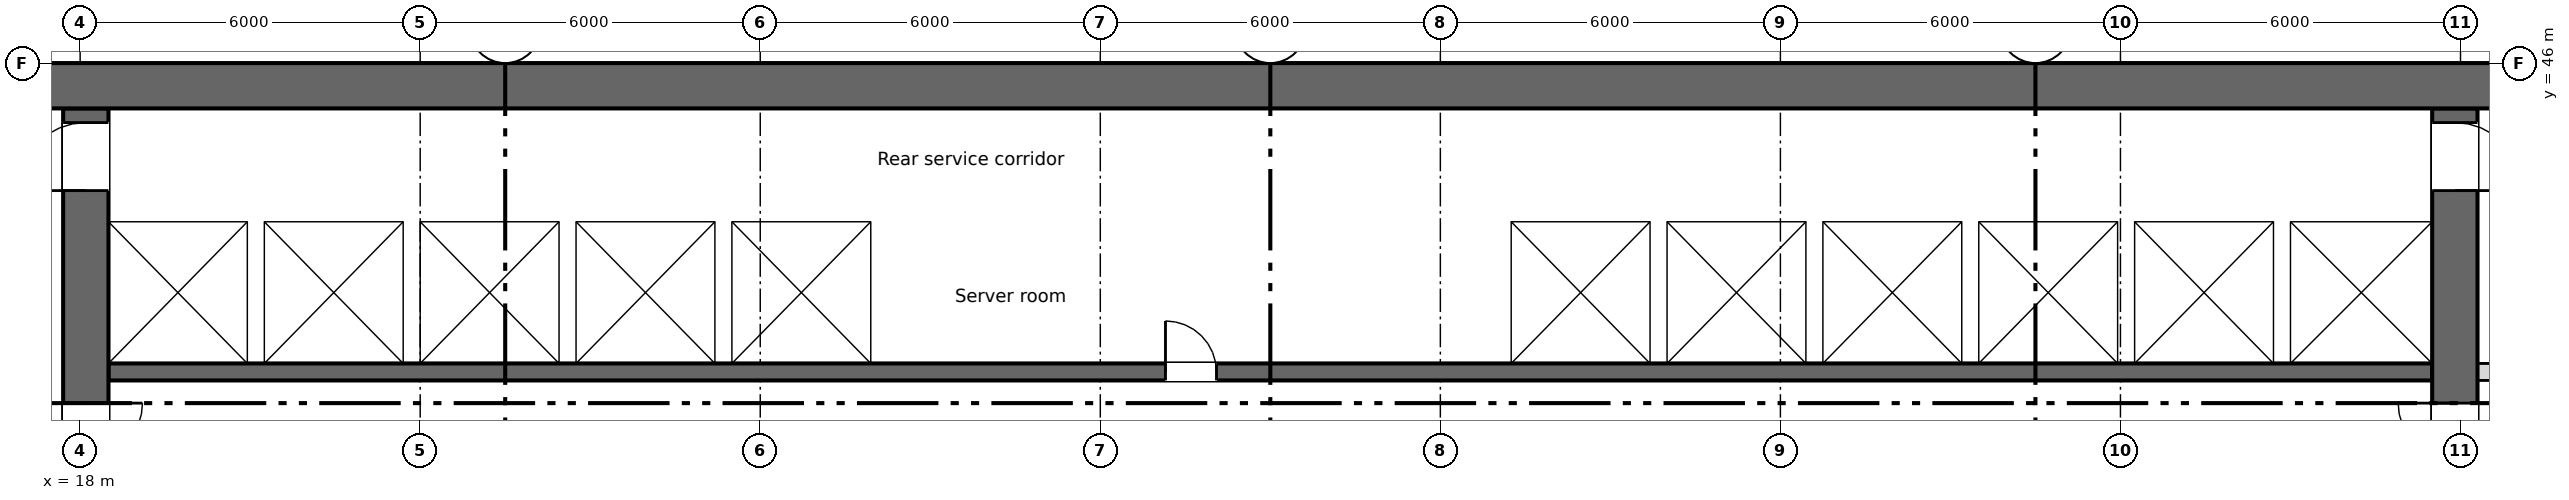
"""IFC4 building model, lengths in metres.
Left out: names, types, materials, properties, quantities, classifications, styles, units other than length and angle.
Written with IfcOpenShell. Run it as: python <this file> out.ifc"""

import sys

from ifc_helpers import new_model, si_unit, direction, frame, frame_2d, origin, place, context, subcontext, project, spatial, rectangle, extrude, element, fill, save


model = new_model("IFC4")
c1 = context("Model", 3, precision=1e-05, world=origin(), true_north=direction((0.0, 1.0)))
c2 = subcontext(c1, "Body", "Model", "MODEL_VIEW")
j1 = project(units=[si_unit("LENGTHUNIT", "METRE"), si_unit("PLANEANGLEUNIT", "RADIAN")], contexts=[c1])
p1 = place(None, origin())
s1 = spatial("IfcSite", under=j1, at=p1, CompositionType="ELEMENT")
p2 = place(p1, origin())
s2 = spatial("IfcBuilding", under=s1, at=p2, CompositionType="ELEMENT")
p3 = place(p2, frame((0.0, 0.0, 121.25)))
s3 = spatial("IfcBuildingStorey", under=s2, at=p3, CompositionType="ELEMENT", Elevation=121.25)
p4 = place(p3, frame((5.55, 45.6, 0.0), z_axis=(0.0, 0.0, 1.0), x_axis=(1.0, 0.0, 0.0)))
e1 = element("IfcWall", 1, at=p4, inside=s3, PredefinedType="SHEAR", context=c2, shape_type="SweptSolid", body=[
    extrude(rectangle(XDim=60.9, YDim=0.8, at=frame_2d((30.45, 0.0))), origin(), (0.0, 0.0, 1.0), 3.35),
])
p5 = place(p4, frame((7.2, 0.0, 0.6)))
e2 = element("IfcOpeningElement", 2, at=p5, cuts=e1, PredefinedType="OPENING", context=c2, shape_type="SweptSolid", body=[
    extrude(rectangle(XDim=0.6, YDim=2.4, at=frame_2d((0.3, 1.2))), frame((0.0, 0.41, 0.0), z_axis=(0.0, -1.0, 0.0), x_axis=(1.0, 0.0, 0.0)), (0.0, 0.0, 1.0), 0.82),
])
p6 = place(p3, frame((18.1, 28.4, 0.0), z_axis=(0.0, 0.0, 1.0), x_axis=(0.0, 1.0, 0.0)))
e3 = element("IfcWall", 3, at=p6, inside=s3, PredefinedType="SHEAR", context=c2, shape_type="SweptSolid", body=[
    extrude(rectangle(XDim=16.8, YDim=0.8, at=frame_2d((8.4, 0.0))), origin(), (0.0, 0.0, 1.0), 3.35),
])
p7 = place(p6, frame((9.6, 0.0, 0.0)))
e4 = element("IfcOpeningElement", 4, at=p7, cuts=e3, PredefinedType="OPENING", context=c2, shape_type="SweptSolid", body=[
    extrude(rectangle(XDim=2.0, YDim=2.1, at=frame_2d((1.0, 1.05))), frame((0.0, 0.41, 0.0), z_axis=(0.0, -1.0, 0.0), x_axis=(1.0, 0.0, 0.0)), (0.0, 0.0, 1.0), 0.82),
])
p8 = place(p6, frame((15.35, 0.0, 0.0)))
e5 = element("IfcOpeningElement", 5, at=p8, cuts=e3, PredefinedType="OPENING", context=c2, shape_type="SweptSolid", body=[
    extrude(rectangle(XDim=1.2, YDim=2.1, at=frame_2d((0.6, 1.05))), frame((0.0, 0.41, 0.0), z_axis=(0.0, -1.0, 0.0), x_axis=(1.0, 0.0, 0.0)), (0.0, 0.0, 1.0), 0.82),
])
p9 = place(p3, frame((59.9, 28.4, 0.0), z_axis=(0.0, 0.0, 1.0), x_axis=(0.0, 1.0, 0.0)))
e6 = element("IfcWall", 6, at=p9, inside=s3, PredefinedType="SHEAR", context=c2, shape_type="SweptSolid", body=[
    extrude(rectangle(XDim=16.8, YDim=0.8, at=frame_2d((8.4, 0.0))), origin(), (0.0, 0.0, 1.0), 3.35),
])
p10 = place(p9, frame((9.6, 0.0, 0.0)))
e7 = element("IfcOpeningElement", 7, at=p10, cuts=e6, PredefinedType="OPENING", context=c2, shape_type="SweptSolid", body=[
    extrude(rectangle(XDim=2.0, YDim=2.1, at=frame_2d((1.0, 1.05))), frame((0.0, 0.41, 0.0), z_axis=(0.0, -1.0, 0.0), x_axis=(1.0, 0.0, 0.0)), (0.0, 0.0, 1.0), 0.82),
])
p11 = place(p9, frame((15.35, 0.0, 0.0)))
e8 = element("IfcOpeningElement", 8, at=p11, cuts=e6, PredefinedType="OPENING", context=c2, shape_type="SweptSolid", body=[
    extrude(rectangle(XDim=1.2, YDim=2.1, at=frame_2d((0.6, 1.05))), frame((0.0, 0.41, 0.0), z_axis=(0.0, -1.0, 0.0), x_axis=(1.0, 0.0, 0.0)), (0.0, 0.0, 1.0), 0.82),
])
p12 = place(p3, frame((18.5, 40.55, 0.0), z_axis=(0.0, 0.0, 1.0), x_axis=(1.0, 0.0, 0.0)))
e9 = element("IfcWall", 9, at=p12, inside=s3, PredefinedType="SHEAR", context=c2, shape_type="SweptSolid", body=[
    extrude(rectangle(XDim=41.0, YDim=0.3, at=frame_2d((20.5, 0.0))), origin(), (0.0, 0.0, 1.0), 3.35),
])
p13 = place(p12, frame((18.65, 0.0, 0.0)))
e10 = element("IfcOpeningElement", 10, at=p13, cuts=e9, PredefinedType="OPENING", context=c2, shape_type="SweptSolid", body=[
    extrude(rectangle(XDim=0.9, YDim=2.1, at=frame_2d((0.45, 1.05))), frame((0.0, 0.16, 0.0), z_axis=(0.0, -1.0, 0.0), x_axis=(1.0, 0.0, 0.0)), (0.0, 0.0, 1.0), 0.32),
])
p14 = place(p12, frame((6.175, 0.0, 0.0)))
e11 = element("IfcOpeningElement", 11, at=p14, cuts=e9, PredefinedType="OPENING", context=c2, shape_type="SweptSolid", body=[
    extrude(rectangle(XDim=1.1, YDim=2.1, at=frame_2d((0.55, 1.05))), frame((0.0, 0.16, 0.0), z_axis=(0.0, -1.0, 0.0), x_axis=(1.0, 0.0, 0.0)), (0.0, 0.0, 1.0), 0.32),
])
p15 = place(p12, frame((8.925, 0.0, 0.0)))
e12 = element("IfcOpeningElement", 12, at=p15, cuts=e9, PredefinedType="OPENING", context=c2, shape_type="SweptSolid", body=[
    extrude(rectangle(XDim=1.1, YDim=2.1, at=frame_2d((0.55, 1.05))), frame((0.0, 0.16, 0.0), z_axis=(0.0, -1.0, 0.0), x_axis=(1.0, 0.0, 0.0)), (0.0, 0.0, 1.0), 0.32),
])
p16 = place(p12, frame((11.675, 0.0, 0.0)))
e13 = element("IfcOpeningElement", 13, at=p16, cuts=e9, PredefinedType="OPENING", context=c2, shape_type="SweptSolid", body=[
    extrude(rectangle(XDim=1.1, YDim=2.1, at=frame_2d((0.55, 1.05))), frame((0.0, 0.16, 0.0), z_axis=(0.0, -1.0, 0.0), x_axis=(1.0, 0.0, 0.0)), (0.0, 0.0, 1.0), 0.32),
])
p17 = place(p12, frame((30.925, 0.0, 0.0)))
e14 = element("IfcOpeningElement", 14, at=p17, cuts=e9, PredefinedType="OPENING", context=c2, shape_type="SweptSolid", body=[
    extrude(rectangle(XDim=1.1, YDim=2.1, at=frame_2d((0.55, 1.05))), frame((0.0, 0.16, 0.0), z_axis=(0.0, -1.0, 0.0), x_axis=(1.0, 0.0, 0.0)), (0.0, 0.0, 1.0), 0.32),
])
p18 = place(p12, frame((33.675, 0.0, 0.0)))
e15 = element("IfcOpeningElement", 15, at=p18, cuts=e9, PredefinedType="OPENING", context=c2, shape_type="SweptSolid", body=[
    extrude(rectangle(XDim=1.1, YDim=2.1, at=frame_2d((0.55, 1.05))), frame((0.0, 0.16, 0.0), z_axis=(0.0, -1.0, 0.0), x_axis=(1.0, 0.0, 0.0)), (0.0, 0.0, 1.0), 0.32),
])
p19 = place(p12, frame((36.375, 0.0, 0.0)))
e16 = element("IfcOpeningElement", 16, at=p19, cuts=e9, PredefinedType="OPENING", context=c2, shape_type="SweptSolid", body=[
    extrude(rectangle(XDim=1.2, YDim=2.1, at=frame_2d((0.6, 1.05))), frame((0.0, 0.16, 0.0), z_axis=(0.0, -1.0, 0.0), x_axis=(1.0, 0.0, 0.0)), (0.0, 0.0, 1.0), 0.32),
])
p20 = place(p12, frame((39.15, 0.0, 0.0)))
e17 = element("IfcOpeningElement", 17, at=p20, cuts=e9, PredefinedType="OPENING", context=c2, shape_type="SweptSolid", body=[
    extrude(rectangle(XDim=1.2, YDim=2.1, at=frame_2d((0.6, 1.05))), frame((0.0, 0.16, 0.0), z_axis=(0.0, -1.0, 0.0), x_axis=(1.0, 0.0, 0.0)), (0.0, 0.0, 1.0), 0.32),
])
p21 = place(p3, frame((18.5, 43.35, 0.0), z_axis=(0.0, 0.0, 1.0), x_axis=(1.0, 0.0, 0.0)))
e18 = element("IfcWall", 18, at=p21, inside=s3, PredefinedType="SHEAR", context=c2, shape_type="SweptSolid", body=[
    extrude(rectangle(XDim=41.0, YDim=0.3, at=frame_2d((20.5, 0.0))), origin(), (0.0, 0.0, 1.0), 3.35),
])
p22 = place(p3, frame((60.3, 40.55, 0.0), z_axis=(0.0, 0.0, 1.0), x_axis=(1.0, 0.0, 0.0)))
e19 = element("IfcWall", 19, at=p22, inside=s3, PredefinedType="PARTITIONING", context=c2, shape_type="SweptSolid", body=[
    extrude(rectangle(XDim=2.4, YDim=0.3, at=frame_2d((1.2, 0.0))), origin(), (0.0, 0.0, 1.0), 3.35),
])
p23 = place(p22, frame((0.675, 0.0, 0.0)))
e20 = element("IfcOpeningElement", 20, at=p23, cuts=e19, PredefinedType="OPENING", context=c2, shape_type="SweptSolid", body=[
    extrude(rectangle(XDim=0.9, YDim=2.1, at=frame_2d((0.45, 1.05))), frame((0.0, 0.16, 0.0), z_axis=(0.0, -1.0, 0.0), x_axis=(1.0, 0.0, 0.0)), (0.0, 0.0, 1.0), 0.32),
])
for number, where, z_axis, x_axis in (
    (21, (21.1, 40.7, 0.0), (0.0, 0.0, 1.0), (0.0, 1.0, 0.0)),
    (22, (23.85, 40.7, 0.0), (0.0, 0.0, 1.0), (0.0, 1.0, 0.0)),
    (23, (26.6, 40.7, 0.0), (0.0, 0.0, 1.0), (0.0, 1.0, 0.0)),
    (24, (29.35, 40.7, 0.0), (0.0, 0.0, 1.0), (0.0, 1.0, 0.0)),
    (25, (32.1, 40.7, 0.0), (0.0, 0.0, 1.0), (0.0, 1.0, 0.0)),
    (26, (43.1, 40.7, 0.0), (0.0, 0.0, 1.0), (0.0, 1.0, 0.0)),
    (27, (45.85, 40.7, 0.0), (0.0, 0.0, 1.0), (0.0, 1.0, 0.0)),
    (28, (48.6, 40.7, 0.0), (0.0, 0.0, 1.0), (0.0, 1.0, 0.0)),
    (29, (51.35, 40.7, 0.0), (0.0, 0.0, 1.0), (0.0, 1.0, 0.0)),
    (30, (54.1, 40.7, 0.0), (0.0, 0.0, 1.0), (0.0, 1.0, 0.0)),
    (31, (56.85, 40.7, 0.0), (0.0, 0.0, 1.0), (0.0, 1.0, 0.0)),
):
    element("IfcWall", number, at=place(p3, frame(where, z_axis=z_axis, x_axis=x_axis)), inside=s3, PredefinedType="SHEAR", context=c2, shape_type="SweptSolid", body=[
        extrude(rectangle(XDim=2.5, YDim=0.3, at=frame_2d((1.25, 0.0))), origin(), (0.0, 0.0, 1.0), 3.35),
    ])
p24 = place(p13, origin())
e32 = element("IfcDoor", 32, at=p24, inside=s3, OperationType="SINGLE_SWING_LEFT", PredefinedType="DOOR", context=c2, shape_type="SweptSolid", body=[
    extrude(rectangle(XDim=0.9, YDim=2.1, at=frame_2d((0.45, 1.05))), frame((0.0, 0.025, 0.0), z_axis=(0.0, -1.0, 0.0), x_axis=(1.0, 0.0, 0.0)), (0.0, 0.0, 1.0), 0.05),
])
fill(e10, e32)
p25 = place(p14, origin())
e33 = element("IfcDoor", 33, at=p25, inside=s3, OperationType="SLIDING_TO_LEFT", PredefinedType="DOOR", context=c2, shape_type="SweptSolid", body=[
    extrude(rectangle(XDim=1.1, YDim=2.1, at=frame_2d((0.55, 1.05))), frame((0.0, 0.025, 0.0), z_axis=(0.0, -1.0, 0.0), x_axis=(1.0, 0.0, 0.0)), (0.0, 0.0, 1.0), 0.05),
])
fill(e11, e33)
p26 = place(p15, origin())
e34 = element("IfcDoor", 34, at=p26, inside=s3, OperationType="SLIDING_TO_LEFT", PredefinedType="DOOR", context=c2, shape_type="SweptSolid", body=[
    extrude(rectangle(XDim=1.1, YDim=2.1, at=frame_2d((0.55, 1.05))), frame((0.0, 0.025, 0.0), z_axis=(0.0, -1.0, 0.0), x_axis=(1.0, 0.0, 0.0)), (0.0, 0.0, 1.0), 0.05),
])
fill(e12, e34)
p27 = place(p16, origin())
e35 = element("IfcDoor", 35, at=p27, inside=s3, OperationType="SLIDING_TO_LEFT", PredefinedType="DOOR", context=c2, shape_type="SweptSolid", body=[
    extrude(rectangle(XDim=1.1, YDim=2.1, at=frame_2d((0.55, 1.05))), frame((0.0, 0.025, 0.0), z_axis=(0.0, -1.0, 0.0), x_axis=(1.0, 0.0, 0.0)), (0.0, 0.0, 1.0), 0.05),
])
fill(e13, e35)
p28 = place(p17, origin())
e36 = element("IfcDoor", 36, at=p28, inside=s3, OperationType="SLIDING_TO_LEFT", PredefinedType="DOOR", context=c2, shape_type="SweptSolid", body=[
    extrude(rectangle(XDim=1.1, YDim=2.1, at=frame_2d((0.55, 1.05))), frame((0.0, 0.025, 0.0), z_axis=(0.0, -1.0, 0.0), x_axis=(1.0, 0.0, 0.0)), (0.0, 0.0, 1.0), 0.05),
])
fill(e14, e36)
p29 = place(p18, origin())
e37 = element("IfcDoor", 37, at=p29, inside=s3, OperationType="SLIDING_TO_LEFT", PredefinedType="DOOR", context=c2, shape_type="SweptSolid", body=[
    extrude(rectangle(XDim=1.1, YDim=2.1, at=frame_2d((0.55, 1.05))), frame((0.0, 0.025, 0.0), z_axis=(0.0, -1.0, 0.0), x_axis=(1.0, 0.0, 0.0)), (0.0, 0.0, 1.0), 0.05),
])
fill(e15, e37)
p30 = place(p19, origin())
e38 = element("IfcDoor", 38, at=p30, inside=s3, OperationType="SLIDING_TO_LEFT", PredefinedType="DOOR", context=c2, shape_type="SweptSolid", body=[
    extrude(rectangle(XDim=1.2, YDim=2.1, at=frame_2d((0.6, 1.05))), frame((0.0, 0.025, 0.0), z_axis=(0.0, -1.0, 0.0), x_axis=(1.0, 0.0, 0.0)), (0.0, 0.0, 1.0), 0.05),
])
fill(e16, e38)
p31 = place(p20, origin())
e39 = element("IfcDoor", 39, at=p31, inside=s3, OperationType="SLIDING_TO_LEFT", PredefinedType="DOOR", context=c2, shape_type="SweptSolid", body=[
    extrude(rectangle(XDim=1.2, YDim=2.1, at=frame_2d((0.6, 1.05))), frame((0.0, 0.025, 0.0), z_axis=(0.0, -1.0, 0.0), x_axis=(1.0, 0.0, 0.0)), (0.0, 0.0, 1.0), 0.05),
])
fill(e17, e39)
p32 = place(p7, origin())
e40 = element("IfcDoor", 40, at=p32, inside=s3, OperationType="DOUBLE_DOOR_SINGLE_SWING", PredefinedType="DOOR", context=c2, shape_type="SweptSolid", body=[
    extrude(rectangle(XDim=2.0, YDim=2.1, at=frame_2d((1.0, 1.05))), frame((0.0, 0.025, 0.0), z_axis=(0.0, -1.0, 0.0), x_axis=(1.0, 0.0, 0.0)), (0.0, 0.0, 1.0), 0.05),
])
fill(e4, e40)
p33 = place(p10, origin())
e41 = element("IfcDoor", 41, at=p33, inside=s3, OperationType="DOUBLE_DOOR_SINGLE_SWING", PredefinedType="DOOR", context=c2, shape_type="SweptSolid", body=[
    extrude(rectangle(XDim=2.0, YDim=2.1, at=frame_2d((1.0, 1.05))), frame((0.0, 0.025, 0.0), z_axis=(0.0, -1.0, 0.0), x_axis=(1.0, 0.0, 0.0)), (0.0, 0.0, 1.0), 0.05),
])
fill(e7, e41)
p34 = place(p8, origin())
e42 = element("IfcDoor", 42, at=p34, inside=s3, OperationType="SINGLE_SWING_LEFT", PredefinedType="DOOR", context=c2, shape_type="SweptSolid", body=[
    extrude(rectangle(XDim=1.2, YDim=2.1, at=frame_2d((0.6, 1.05))), frame((0.0, 0.025, 0.0), z_axis=(0.0, -1.0, 0.0), x_axis=(1.0, 0.0, 0.0)), (0.0, 0.0, 1.0), 0.05),
])
fill(e5, e42)
p35 = place(p11, origin())
e43 = element("IfcDoor", 43, at=p35, inside=s3, OperationType="SINGLE_SWING_LEFT", PredefinedType="DOOR", context=c2, shape_type="SweptSolid", body=[
    extrude(rectangle(XDim=1.2, YDim=2.1, at=frame_2d((0.6, 1.05))), frame((0.0, 0.025, 0.0), z_axis=(0.0, -1.0, 0.0), x_axis=(1.0, 0.0, 0.0)), (0.0, 0.0, 1.0), 0.05),
])
fill(e8, e43)
save(model, sys.argv[1])
